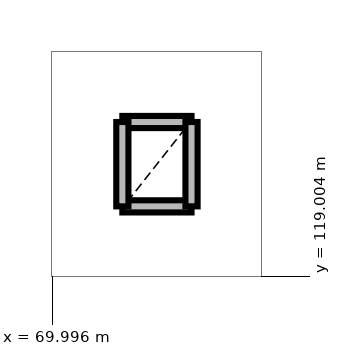
"""IFC4 building model, lengths in metres.
Left out: names, types, materials, properties, quantities, classifications, styles, units other than length and angle.
Written with IfcOpenShell. Run it as: python <this file> out.ifc"""

import sys

from ifc_helpers import new_model, si_unit, direction, frame, frame_2d, origin, place, context, subcontext, project, spatial, rectangle, extrude, element, save


model = new_model("IFC4")
c1 = context("Model", 3, precision=1e-05, world=origin(), true_north=direction((0.0, 1.0)))
c2 = subcontext(c1, "Body", "Model", "MODEL_VIEW")
j1 = project(units=[si_unit("LENGTHUNIT", "METRE"), si_unit("PLANEANGLEUNIT", "RADIAN")], contexts=[c1])
p1 = place(None, origin())
s1 = spatial("IfcSite", under=j1, at=p1, CompositionType="ELEMENT")
p2 = place(p1, origin())
s2 = spatial("IfcBuilding", under=s1, at=p2, CompositionType="ELEMENT")
p3 = place(p2, frame((0.0, 0.0, 5.1)))
s3 = spatial("IfcBuildingStorey", under=s2, at=p3, CompositionType="ELEMENT", Elevation=5.1)
for number, where, z_axis, x_axis in (
    (1, (70.92, 119.92, 0.0), (0.0, 0.0, 1.0), (1.0, 0.0, 0.0)),
    (2, (71.83, 121.03, 0.0), (0.0, 0.0, 1.0), (-1.0, 0.0, 0.0)),
):
    element("IfcWall", number, at=place(p3, frame(where, z_axis=z_axis, x_axis=x_axis)), inside=s3, PredefinedType="PARTITIONING", context=c2, shape_type="SweptSolid", body=[
        extrude(rectangle(XDim=0.91, YDim=0.16, at=frame_2d((0.455, 0.0))), origin(), (0.0, 0.0, 1.0), 3.65),
    ])
for number, where, z_axis, x_axis in (
    (3, (70.92, 121.03, 0.0), (0.0, 0.0, 1.0), (0.0, -1.0, 0.0)),
    (4, (71.83, 119.92, 0.0), (0.0, 0.0, 1.0), (0.0, 1.0, 0.0)),
):
    element("IfcWall", number, at=place(p3, frame(where, z_axis=z_axis, x_axis=x_axis)), inside=s3, PredefinedType="PARTITIONING", context=c2, shape_type="SweptSolid", body=[
        extrude(rectangle(XDim=1.11, YDim=0.16, at=frame_2d((0.555, 0.0))), origin(), (0.0, 0.0, 1.0), 3.65),
    ])
save(model, sys.argv[1])
